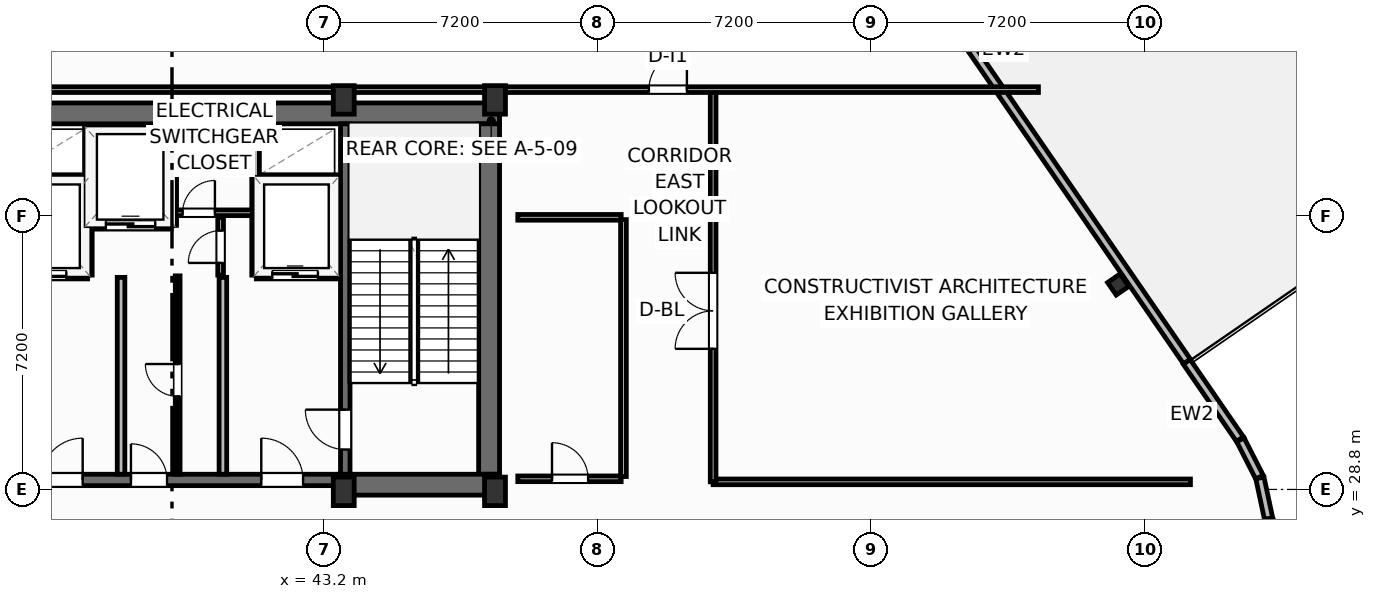
"""IFC4 building model, lengths in metres.
Left out: names, types, materials, properties, quantities, classifications, styles, units other than length and angle.
Written with IfcOpenShell. Run it as: python <this file> out.ifc"""

import sys

from ifc_helpers import new_model, si_unit, direction, frame, frame_2d, origin, origin_2d, place, context, subcontext, project, spatial, rectangle, i_section, extrude, element, fill, save


model = new_model("IFC4")
c1 = context("Model", 3, precision=1e-05, world=origin(), true_north=direction((0.0, 1.0)))
c2 = subcontext(c1, "Body", "Model", "MODEL_VIEW")
j1 = project(units=[si_unit("LENGTHUNIT", "METRE"), si_unit("PLANEANGLEUNIT", "RADIAN")], contexts=[c1])
p1 = place(None, origin())
s1 = spatial("IfcSite", under=j1, at=p1, CompositionType="ELEMENT")
p2 = place(p1, origin())
s2 = spatial("IfcBuilding", under=s1, at=p2, CompositionType="ELEMENT")
p3 = place(p2, frame((0.0, 0.0, 296.3)))
s3 = spatial("IfcBuildingStorey", under=s2, at=p3, CompositionType="ELEMENT", Elevation=296.3)
for number, where, z_axis, x_axis in (
    (1, (43.72, 28.75, 0.0), (0.0, 0.0, 1.0), (1.0, 0.0, 0.0)),
    (2, (47.7, 28.75, 0.0), (0.0, 0.0, 1.0), (1.0, 0.0, 0.0)),
    (3, (43.72, 39.05, 0.0), (0.0, 0.0, 1.0), (1.0, 0.0, 0.0)),
    (4, (47.7, 39.05, 0.0), (0.0, 0.0, 1.0), (1.0, 0.0, 0.0)),
):
    element("IfcColumn", number, at=place(p3, frame(where, z_axis=z_axis, x_axis=x_axis)), inside=s3, PredefinedType="COLUMN", context=c2, shape_type="SweptSolid", body=[
        extrude(rectangle(XDim=0.55, YDim=0.75, at=origin_2d()), origin(), (0.0, 0.0, 1.0), 4.8),
    ])
p4 = place(p3, frame((30.58, 38.695, 0.0), z_axis=(0.0, 0.0, 1.0), x_axis=(1.0, 0.0, 0.0)))
e5 = element("IfcWall", 5, at=p4, inside=s3, PredefinedType="SHEAR", context=c2, shape_type="SweptSolid", body=[
    extrude(rectangle(XDim=17.24, YDim=0.55, at=frame_2d((8.62, 0.0))), origin(), (0.0, 0.0, 1.0), 4.55),
])
p5 = place(p3, frame((47.545, 29.2, 0.0), z_axis=(0.0, 0.0, 1.0), x_axis=(0.0, 1.0, 0.0)))
e6 = element("IfcWall", 6, at=p5, inside=s3, PredefinedType="SHEAR", context=c2, shape_type="SweptSolid", body=[
    extrude(rectangle(XDim=9.22, YDim=0.55, at=frame_2d((4.61, 0.0))), origin(), (0.0, 0.0, 1.0), 4.55),
])
p6 = place(p3, frame((43.6, 28.925, 0.0), z_axis=(0.0, 0.0, 1.0), x_axis=(1.0, 0.0, 0.0)))
e7 = element("IfcWall", 7, at=p6, inside=s3, PredefinedType="SHEAR", context=c2, shape_type="SweptSolid", body=[
    extrude(rectangle(XDim=4.22, YDim=0.55, at=frame_2d((2.11, 0.0))), origin(), (0.0, 0.0, 1.0), 4.55),
])
p7 = place(p3, frame((34.8, 29.05, 0.0), z_axis=(0.0, 0.0, 1.0), x_axis=(1.0, 0.0, 0.0)))
e8 = element("IfcWall", 8, at=p7, inside=s3, PredefinedType="SHEAR", context=c2, shape_type="SweptSolid", body=[
    extrude(rectangle(XDim=8.8, YDim=0.3, at=frame_2d((4.4, 0.0))), origin(), (0.0, 0.0, 1.0), 4.55),
])
p8 = place(p7, frame((0.95, 0.0, 0.0)))
e9 = element("IfcOpeningElement", 9, at=p8, cuts=e8, PredefinedType="OPENING", context=c2, shape_type="SweptSolid", body=[
    extrude(rectangle(XDim=1.1, YDim=2.15, at=frame_2d((0.55, 1.075))), frame((0.0, 0.16, 0.0), z_axis=(0.0, -1.0, 0.0), x_axis=(1.0, 0.0, 0.0)), (0.0, 0.0, 1.0), 0.32),
])
p9 = place(p7, frame((6.75, 0.0, 0.0)))
e10 = element("IfcOpeningElement", 10, at=p9, cuts=e8, PredefinedType="OPENING", context=c2, shape_type="SweptSolid", body=[
    extrude(rectangle(XDim=1.1, YDim=2.15, at=frame_2d((0.55, 1.075))), frame((0.0, 0.16, 0.0), z_axis=(0.0, -1.0, 0.0), x_axis=(1.0, 0.0, 0.0)), (0.0, 0.0, 1.0), 0.32),
])
p10 = place(p7, frame((3.32, 0.0, 0.0)))
e11 = element("IfcOpeningElement", 11, at=p10, cuts=e8, PredefinedType="OPENING", context=c2, shape_type="SweptSolid", body=[
    extrude(rectangle(XDim=0.95, YDim=2.15, at=frame_2d((0.475, 1.075))), frame((0.0, 0.16, 0.0), z_axis=(0.0, -1.0, 0.0), x_axis=(1.0, 0.0, 0.0)), (0.0, 0.0, 1.0), 0.32),
])
p11 = place(p3, frame((43.76, 29.2, 0.0), z_axis=(0.0, 0.0, 1.0), x_axis=(0.0, 1.0, 0.0)))
e12 = element("IfcWall", 12, at=p11, inside=s3, PredefinedType="SHEAR", context=c2, shape_type="SweptSolid", body=[
    extrude(rectangle(XDim=9.22, YDim=0.25, at=frame_2d((4.61, 0.0))), origin(), (0.0, 0.0, 1.0), 4.55),
])
p12 = place(p11, frame((0.65, 0.0, 0.0)))
e13 = element("IfcOpeningElement", 13, at=p12, cuts=e12, PredefinedType="OPENING", context=c2, shape_type="SweptSolid", body=[
    extrude(rectangle(XDim=1.05, YDim=2.15, at=frame_2d((0.525, 1.075))), frame((0.0, 0.135, 0.0), z_axis=(0.0, -1.0, 0.0), x_axis=(1.0, 0.0, 0.0)), (0.0, 0.0, 1.0), 0.27),
])
p13 = place(p3, frame((64.099, 34.194, -0.32), z_axis=(0.0, 0.0, 1.0), x_axis=(0.823532597628, 0.567268949127, 0.0)))
e14 = element("IfcColumn", 14, at=p13, inside=s3, PredefinedType="COLUMN", context=c2, shape_type="SweptSolid", body=[
    extrude(i_section(OverallWidth=0.401, OverallDepth=0.399, WebThickness=0.025, FlangeThickness=0.04, FilletRadius=0.022, at=origin_2d()), origin(), (0.0, 0.0, 1.0), 5.12),
])
p14 = place(p3, frame((13.489, 27.37, 0.0), z_axis=(0.0, 0.0, 1.0), x_axis=(0.823532439547, 0.567269178622, 0.0)))
e15 = element("IfcWall", 15, at=p14, inside=s3, PredefinedType="SOLIDWALL", context=c2, shape_type="SweptSolid", body=[
    extrude(rectangle(XDim=40.0, YDim=0.22, at=frame_2d((20.0, 0.0))), origin(), (0.0, 0.0, 1.0), 3.83),
])
p15 = place(p14, frame((25.598, 0.0, 0.0)))
e16 = element("IfcOpeningElement", 16, at=p15, cuts=e15, PredefinedType="OPENING", context=c2, shape_type="SweptSolid", body=[
    extrude(rectangle(XDim=1.95, YDim=2.35, at=frame_2d((0.975, 1.175))), frame((0.0, 0.12, 0.0), z_axis=(0.0, -1.0, 0.0), x_axis=(1.0, 0.0, 0.0)), (0.0, 0.0, 1.0), 0.24),
])
p16 = place(p14, frame((0.55, 0.0, 0.75)))
e17 = element("IfcOpeningElement", 17, at=p16, cuts=e15, PredefinedType="OPENING", context=c2, shape_type="SweptSolid", body=[
    extrude(rectangle(XDim=2.6, YDim=2.0, at=frame_2d((1.3, 1.0))), frame((0.0, 0.12, 0.0), z_axis=(0.0, -1.0, 0.0), x_axis=(1.0, 0.0, 0.0)), (0.0, 0.0, 1.0), 0.24),
])
p17 = place(p14, frame((36.85, 0.0, 0.75)))
e18 = element("IfcOpeningElement", 18, at=p17, cuts=e15, PredefinedType="OPENING", context=c2, shape_type="SweptSolid", body=[
    extrude(rectangle(XDim=2.6, YDim=2.0, at=frame_2d((1.3, 1.0))), frame((0.0, 0.12, 0.0), z_axis=(0.0, -1.0, 0.0), x_axis=(1.0, 0.0, 0.0)), (0.0, 0.0, 1.0), 0.24),
])
p18 = place(p3, frame((55.132, 47.81, 0.0), z_axis=(0.0, 0.0, 1.0), x_axis=(0.567274059121, -0.823529077719, 0.0)))
e19 = element("IfcWall", 19, at=p18, inside=s3, PredefinedType="SOLIDWALL", context=c2, shape_type="SweptSolid", body=[
    extrude(rectangle(XDim=19.0, YDim=0.22, at=frame_2d((9.5, 0.0))), origin(), (0.0, 0.0, 1.0), 3.83),
])
p19 = place(p18, frame((4.562, 0.0, 0.0)))
e20 = element("IfcOpeningElement", 20, at=p19, cuts=e19, PredefinedType="OPENING", context=c2, shape_type="SweptSolid", body=[
    extrude(rectangle(XDim=1.95, YDim=2.35, at=frame_2d((0.975, 1.175))), frame((0.0, 0.12, 0.0), z_axis=(0.0, -1.0, 0.0), x_axis=(1.0, 0.0, 0.0)), (0.0, 0.0, 1.0), 0.24),
])
p20 = place(p3, frame((68.056, 28.035, 0.0), z_axis=(0.0, 0.0, 1.0), x_axis=(-0.208994780981, 0.977916755927, 0.0)))
e21 = element("IfcWall", 21, at=p20, inside=s3, PredefinedType="SOLIDWALL", context=c2, shape_type="SweptSolid", body=[
    extrude(rectangle(XDim=1.092, YDim=0.22, at=frame_2d((0.546, 0.0))), origin(), (0.0, 0.0, 1.0), 3.83),
])
p21 = place(p3, frame((67.816, 29.125, 0.0), z_axis=(0.0, 0.0, 1.0), x_axis=(-0.454833347613, 0.890576569363, 0.0)))
e22 = element("IfcWall", 22, at=p21, inside=s3, PredefinedType="SOLIDWALL", context=c2, shape_type="SweptSolid", body=[
    extrude(rectangle(XDim=1.1, YDim=0.22, at=frame_2d((0.55, 0.0))), origin(), (0.0, 0.0, 1.0), 3.83),
])
p22 = place(p3, frame((67.302, 30.125, 0.0), z_axis=(0.0, 0.0, 1.0), x_axis=(-0.567196370166, 0.823582587037, 0.0)))
e23 = element("IfcWall", 23, at=p22, inside=s3, PredefinedType="SOLIDWALL", context=c2, shape_type="SweptSolid", body=[
    extrude(rectangle(XDim=2.467, YDim=0.22, at=frame_2d((1.234, 0.0))), origin(), (0.0, 0.0, 1.0), 3.83),
])
p23 = place(p3, frame((53.44, 29.0, 0.0), z_axis=(0.0, 0.0, 1.0), x_axis=(1.0, 0.0, 0.0)))
e24 = element("IfcWall", 24, at=p23, inside=s3, PredefinedType="PARTITIONING", context=c2, shape_type="SweptSolid", body=[
    extrude(rectangle(XDim=12.56, YDim=0.15, at=frame_2d((6.28, 0.0))), origin(), (0.0, 0.0, 1.0), 4.55),
])
p24 = place(p3, frame((53.44, 29.0, 0.0), z_axis=(0.0, 0.0, 1.0), x_axis=(0.0, 1.0, 0.0)))
e25 = element("IfcWall", 25, at=p24, inside=s3, PredefinedType="PARTITIONING", context=c2, shape_type="SweptSolid", body=[
    extrude(rectangle(XDim=10.32, YDim=0.15, at=frame_2d((5.16, 0.0))), origin(), (0.0, 0.0, 1.0), 4.55),
])
p25 = place(p24, frame((3.5, 0.0, 0.0)))
e26 = element("IfcOpeningElement", 26, at=p25, cuts=e25, PredefinedType="OPENING", context=c2, shape_type="SweptSolid", body=[
    extrude(rectangle(XDim=2.0, YDim=2.05, at=frame_2d((1.0, 1.025))), frame((0.0, 0.085, 0.0), z_axis=(0.0, -1.0, 0.0), x_axis=(1.0, 0.0, 0.0)), (0.0, 0.0, 1.0), 0.17),
])
p26 = place(p3, frame((28.0, 39.32, 0.0), z_axis=(0.0, 0.0, 1.0), x_axis=(1.0, 0.0, 0.0)))
e27 = element("IfcWall", 27, at=p26, inside=s3, PredefinedType="PARTITIONING", context=c2, shape_type="SweptSolid", body=[
    extrude(rectangle(XDim=34.0, YDim=0.15, at=frame_2d((17.0, 0.0))), origin(), (0.0, 0.0, 1.0), 4.55),
])
p27 = place(p26, frame((23.75, 0.0, 0.0)))
e28 = element("IfcOpeningElement", 28, at=p27, cuts=e27, PredefinedType="OPENING", context=c2, shape_type="SweptSolid", body=[
    extrude(rectangle(XDim=1.0, YDim=2.05, at=frame_2d((0.5, 1.025))), frame((0.0, 0.085, 0.0), z_axis=(0.0, -1.0, 0.0), x_axis=(1.0, 0.0, 0.0)), (0.0, 0.0, 1.0), 0.17),
])
for number, where, z_axis, x_axis in (
    (29, (37.86, 29.2, 0.0), (0.0, 0.0, 1.0), (0.0, 1.0, 0.0)),
    (30, (40.54, 29.2, 0.0), (0.0, 0.0, 1.0), (0.0, 1.0, 0.0)),
):
    element("IfcWall", number, at=place(p3, frame(where, z_axis=z_axis, x_axis=x_axis)), inside=s3, PredefinedType="PARTITIONING", context=c2, shape_type="SweptSolid", body=[
        extrude(rectangle(XDim=5.18, YDim=0.2, at=frame_2d((2.59, 0.0))), origin(), (0.0, 0.0, 1.0), 4.55),
    ])
p28 = place(p3, frame((34.8, 34.44, 0.0), z_axis=(0.0, 0.0, 1.0), x_axis=(1.0, 0.0, 0.0)))
e31 = element("IfcWall", 31, at=p28, inside=s3, PredefinedType="PARTITIONING", context=c2, shape_type="SweptSolid", body=[
    extrude(rectangle(XDim=2.18, YDim=0.2, at=frame_2d((1.09, 0.0))), origin(), (0.0, 0.0, 1.0), 4.55),
])
p29 = place(p28, frame((0.42, 0.0, 0.0)))
e32 = element("IfcOpeningElement", 32, at=p29, cuts=e31, PredefinedType="OPENING", context=c2, shape_type="SweptSolid", body=[
    extrude(rectangle(XDim=1.2, YDim=2.2, at=frame_2d((0.6, 1.1))), frame((0.0, 0.11, 0.0), z_axis=(0.0, -1.0, 0.0), x_axis=(1.0, 0.0, 0.0)), (0.0, 0.0, 1.0), 0.22),
])
p30 = place(p3, frame((34.8, 36.98, 0.0), z_axis=(0.0, 0.0, 1.0), x_axis=(1.0, 0.0, 0.0)))
e33 = element("IfcWall", 33, at=p30, inside=s3, PredefinedType="PARTITIONING", context=c2, shape_type="SweptSolid", body=[
    extrude(rectangle(XDim=2.18, YDim=0.2, at=frame_2d((1.09, 0.0))), origin(), (0.0, 0.0, 1.0), 4.55),
])
p31 = place(p3, frame((37.0, 34.44, 0.0), z_axis=(0.0, 0.0, 1.0), x_axis=(0.0, 1.0, 0.0)))
e34 = element("IfcWall", 34, at=p31, inside=s3, PredefinedType="PARTITIONING", context=c2, shape_type="SweptSolid", body=[
    extrude(rectangle(XDim=3.9, YDim=0.2, at=frame_2d((1.95, 0.0))), origin(), (0.0, 0.0, 1.0), 4.55),
])
p32 = place(p3, frame((41.42, 34.44, 0.0), z_axis=(0.0, 0.0, 1.0), x_axis=(1.0, 0.0, 0.0)))
e35 = element("IfcWall", 35, at=p32, inside=s3, PredefinedType="PARTITIONING", context=c2, shape_type="SweptSolid", body=[
    extrude(rectangle(XDim=2.18, YDim=0.2, at=frame_2d((1.09, 0.0))), origin(), (0.0, 0.0, 1.0), 4.55),
])
p33 = place(p32, frame((0.42, 0.0, 0.0)))
e36 = element("IfcOpeningElement", 36, at=p33, cuts=e35, PredefinedType="OPENING", context=c2, shape_type="SweptSolid", body=[
    extrude(rectangle(XDim=1.2, YDim=2.2, at=frame_2d((0.6, 1.1))), frame((0.0, 0.11, 0.0), z_axis=(0.0, -1.0, 0.0), x_axis=(1.0, 0.0, 0.0)), (0.0, 0.0, 1.0), 0.22),
])
p34 = place(p3, frame((41.42, 36.98, 0.0), z_axis=(0.0, 0.0, 1.0), x_axis=(1.0, 0.0, 0.0)))
e37 = element("IfcWall", 37, at=p34, inside=s3, PredefinedType="PARTITIONING", context=c2, shape_type="SweptSolid", body=[
    extrude(rectangle(XDim=2.18, YDim=0.2, at=frame_2d((1.09, 0.0))), origin(), (0.0, 0.0, 1.0), 4.55),
])
p35 = place(p3, frame((41.4, 34.44, 0.0), z_axis=(0.0, 0.0, 1.0), x_axis=(0.0, 1.0, 0.0)))
e38 = element("IfcWall", 38, at=p35, inside=s3, PredefinedType="PARTITIONING", context=c2, shape_type="SweptSolid", body=[
    extrude(rectangle(XDim=3.9, YDim=0.2, at=frame_2d((1.95, 0.0))), origin(), (0.0, 0.0, 1.0), 4.55),
])
p36 = place(p3, frame((37.06, 35.75, 0.0), z_axis=(0.0, 0.0, 1.0), x_axis=(1.0, 0.0, 0.0)))
e39 = element("IfcWall", 39, at=p36, inside=s3, PredefinedType="PARTITIONING", context=c2, shape_type="SweptSolid", body=[
    extrude(rectangle(XDim=2.12, YDim=0.2, at=frame_2d((1.06, 0.0))), origin(), (0.0, 0.0, 1.0), 4.55),
])
p37 = place(p36, frame((0.4, 0.0, 0.0)))
e40 = element("IfcOpeningElement", 40, at=p37, cuts=e39, PredefinedType="OPENING", context=c2, shape_type="SweptSolid", body=[
    extrude(rectangle(XDim=1.3, YDim=2.2, at=frame_2d((0.65, 1.1))), frame((0.0, 0.11, 0.0), z_axis=(0.0, -1.0, 0.0), x_axis=(1.0, 0.0, 0.0)), (0.0, 0.0, 1.0), 0.22),
])
p38 = place(p3, frame((39.22, 35.75, 0.0), z_axis=(0.0, 0.0, 1.0), x_axis=(0.0, 1.0, 0.0)))
e41 = element("IfcWall", 41, at=p38, inside=s3, PredefinedType="PARTITIONING", context=c2, shape_type="SweptSolid", body=[
    extrude(rectangle(XDim=2.59, YDim=0.2, at=frame_2d((1.295, 0.0))), origin(), (0.0, 0.0, 1.0), 4.55),
])
p39 = place(p3, frame((39.3, 36.08, 0.0), z_axis=(0.0, 0.0, 1.0), x_axis=(1.0, 0.0, 0.0)))
e42 = element("IfcWall", 42, at=p39, inside=s3, PredefinedType="PARTITIONING", context=c2, shape_type="SweptSolid", body=[
    extrude(rectangle(XDim=2.02, YDim=0.15, at=frame_2d((1.01, 0.0))), origin(), (0.0, 0.0, 1.0), 4.55),
])
p40 = place(p39, frame((0.18, 0.0, 0.0)))
e43 = element("IfcOpeningElement", 43, at=p40, cuts=e42, PredefinedType="OPENING", context=c2, shape_type="SweptSolid", body=[
    extrude(rectangle(XDim=0.85, YDim=2.05, at=frame_2d((0.425, 1.025))), frame((0.0, 0.085, 0.0), z_axis=(0.0, -1.0, 0.0), x_axis=(1.0, 0.0, 0.0)), (0.0, 0.0, 1.0), 0.17),
])
p41 = place(p3, frame((40.48, 34.44, 0.0), z_axis=(0.0, 0.0, 1.0), x_axis=(0.0, 1.0, 0.0)))
e44 = element("IfcWall", 44, at=p41, inside=s3, PredefinedType="PARTITIONING", context=c2, shape_type="SweptSolid", body=[
    extrude(rectangle(XDim=1.52, YDim=0.15, at=frame_2d((0.76, 0.0))), origin(), (0.0, 0.0, 1.0), 4.55),
])
p42 = place(p41, frame((0.32, 0.0, 0.0)))
e45 = element("IfcOpeningElement", 45, at=p42, cuts=e44, PredefinedType="OPENING", context=c2, shape_type="SweptSolid", body=[
    extrude(rectangle(XDim=0.85, YDim=2.05, at=frame_2d((0.425, 1.025))), frame((0.0, 0.085, 0.0), z_axis=(0.0, -1.0, 0.0), x_axis=(1.0, 0.0, 0.0)), (0.0, 0.0, 1.0), 0.17),
])
p43 = place(p3, frame((39.35, 29.2, 0.0), z_axis=(0.0, 0.0, 1.0), x_axis=(0.0, 1.0, 0.0)))
e46 = element("IfcWall", 46, at=p43, inside=s3, PredefinedType="PARTITIONING", context=c2, shape_type="SweptSolid", body=[
    extrude(rectangle(XDim=5.22, YDim=0.125, at=frame_2d((2.61, 0.0))), origin(), (0.0, 0.0, 1.0), 4.55),
])
p44 = place(p43, frame((2.05, 0.0, 0.0)))
e47 = element("IfcOpeningElement", 47, at=p44, cuts=e46, PredefinedType="OPENING", context=c2, shape_type="SweptSolid", body=[
    extrude(rectangle(XDim=0.85, YDim=2.05, at=frame_2d((0.425, 1.025))), frame((0.0, 0.073, 0.0), z_axis=(0.0, -1.0, 0.0), x_axis=(1.0, 0.0, 0.0)), (0.0, 0.0, 1.0), 0.145),
])
p45 = place(p3, frame((48.3, 29.08, 0.0), z_axis=(0.0, 0.0, 1.0), x_axis=(1.0, 0.0, 0.0)))
e48 = element("IfcWall", 48, at=p45, inside=s3, PredefinedType="PARTITIONING", context=c2, shape_type="SweptSolid", body=[
    extrude(rectangle(XDim=2.72, YDim=0.15, at=frame_2d((1.36, 0.0))), origin(), (0.0, 0.0, 1.0), 4.55),
])
p46 = place(p45, frame((0.9, 0.0, 0.0)))
e49 = element("IfcOpeningElement", 49, at=p46, cuts=e48, PredefinedType="OPENING", context=c2, shape_type="SweptSolid", body=[
    extrude(rectangle(XDim=0.95, YDim=2.05, at=frame_2d((0.475, 1.025))), frame((0.0, 0.085, 0.0), z_axis=(0.0, -1.0, 0.0), x_axis=(1.0, 0.0, 0.0)), (0.0, 0.0, 1.0), 0.17),
])
p47 = place(p3, frame((48.3, 35.96, 0.0), z_axis=(0.0, 0.0, 1.0), x_axis=(1.0, 0.0, 0.0)))
e50 = element("IfcWall", 50, at=p47, inside=s3, PredefinedType="PARTITIONING", context=c2, shape_type="SweptSolid", body=[
    extrude(rectangle(XDim=2.72, YDim=0.15, at=frame_2d((1.36, 0.0))), origin(), (0.0, 0.0, 1.0), 4.55),
])
p48 = place(p3, frame((51.08, 29.14, 0.0), z_axis=(0.0, 0.0, 1.0), x_axis=(0.0, 1.0, 0.0)))
e51 = element("IfcWall", 51, at=p48, inside=s3, PredefinedType="PARTITIONING", context=c2, shape_type="SweptSolid", body=[
    extrude(rectangle(XDim=6.76, YDim=0.15, at=frame_2d((3.38, 0.0))), origin(), (0.0, 0.0, 1.0), 4.55),
])
p49 = place(p25, origin())
e52 = element("IfcDoor", 52, at=p49, inside=s3, OperationType="DOUBLE_DOOR_SINGLE_SWING", PredefinedType="DOOR", context=c2, shape_type="SweptSolid", body=[
    extrude(rectangle(XDim=2.0, YDim=2.05, at=frame_2d((1.0, 1.025))), frame((0.0, 0.025, 0.0), z_axis=(0.0, -1.0, 0.0), x_axis=(1.0, 0.0, 0.0)), (0.0, 0.0, 1.0), 0.05),
])
fill(e26, e52)
p50 = place(p27, origin())
e53 = element("IfcDoor", 53, at=p50, inside=s3, OperationType="SINGLE_SWING_RIGHT", PredefinedType="DOOR", context=c2, shape_type="SweptSolid", body=[
    extrude(rectangle(XDim=1.0, YDim=2.05, at=frame_2d((0.5, 1.025))), frame((0.0, 0.025, 0.0), z_axis=(0.0, -1.0, 0.0), x_axis=(1.0, 0.0, 0.0)), (0.0, 0.0, 1.0), 0.05),
])
fill(e28, e53)
p51 = place(p12, origin())
e54 = element("IfcDoor", 54, at=p51, inside=s3, OperationType="SINGLE_SWING_RIGHT", PredefinedType="DOOR", context=c2, shape_type="SweptSolid", body=[
    extrude(rectangle(XDim=1.05, YDim=2.15, at=frame_2d((0.525, 1.075))), frame((0.0, 0.025, 0.0), z_axis=(0.0, -1.0, 0.0), x_axis=(1.0, 0.0, 0.0)), (0.0, 0.0, 1.0), 0.05),
])
fill(e13, e54)
p52 = place(p8, origin())
e55 = element("IfcDoor", 55, at=p52, inside=s3, OperationType="SINGLE_SWING_RIGHT", PredefinedType="DOOR", context=c2, shape_type="SweptSolid", body=[
    extrude(rectangle(XDim=1.1, YDim=2.15, at=frame_2d((0.55, 1.075))), frame((0.0, 0.025, 0.0), z_axis=(0.0, -1.0, 0.0), x_axis=(1.0, 0.0, 0.0)), (0.0, 0.0, 1.0), 0.05),
])
fill(e9, e55)
p53 = place(p9, origin())
e56 = element("IfcDoor", 56, at=p53, inside=s3, OperationType="SINGLE_SWING_LEFT", PredefinedType="DOOR", context=c2, shape_type="SweptSolid", body=[
    extrude(rectangle(XDim=1.1, YDim=2.15, at=frame_2d((0.55, 1.075))), frame((0.0, 0.025, 0.0), z_axis=(0.0, -1.0, 0.0), x_axis=(1.0, 0.0, 0.0)), (0.0, 0.0, 1.0), 0.05),
])
fill(e10, e56)
p54 = place(p29, origin())
e57 = element("IfcDoor", 57, at=p54, inside=s3, OperationType="SLIDING_TO_LEFT", PredefinedType="DOOR", context=c2, shape_type="SweptSolid", body=[
    extrude(rectangle(XDim=1.2, YDim=2.2, at=frame_2d((0.6, 1.1))), frame((0.0, 0.025, 0.0), z_axis=(0.0, -1.0, 0.0), x_axis=(1.0, 0.0, 0.0)), (0.0, 0.0, 1.0), 0.05),
])
fill(e32, e57)
p55 = place(p33, origin())
e58 = element("IfcDoor", 58, at=p55, inside=s3, OperationType="SLIDING_TO_LEFT", PredefinedType="DOOR", context=c2, shape_type="SweptSolid", body=[
    extrude(rectangle(XDim=1.2, YDim=2.2, at=frame_2d((0.6, 1.1))), frame((0.0, 0.025, 0.0), z_axis=(0.0, -1.0, 0.0), x_axis=(1.0, 0.0, 0.0)), (0.0, 0.0, 1.0), 0.05),
])
fill(e36, e58)
p56 = place(p37, origin())
e59 = element("IfcDoor", 59, at=p56, inside=s3, OperationType="SLIDING_TO_LEFT", PredefinedType="DOOR", context=c2, shape_type="SweptSolid", body=[
    extrude(rectangle(XDim=1.3, YDim=2.2, at=frame_2d((0.65, 1.1))), frame((0.0, 0.025, 0.0), z_axis=(0.0, -1.0, 0.0), x_axis=(1.0, 0.0, 0.0)), (0.0, 0.0, 1.0), 0.05),
])
fill(e40, e59)
p57 = place(p40, origin())
e60 = element("IfcDoor", 60, at=p57, inside=s3, OperationType="SINGLE_SWING_RIGHT", PredefinedType="DOOR", context=c2, shape_type="SweptSolid", body=[
    extrude(rectangle(XDim=0.85, YDim=2.05, at=frame_2d((0.425, 1.025))), frame((0.0, 0.025, 0.0), z_axis=(0.0, -1.0, 0.0), x_axis=(1.0, 0.0, 0.0)), (0.0, 0.0, 1.0), 0.05),
])
fill(e43, e60)
p58 = place(p42, origin())
e61 = element("IfcDoor", 61, at=p58, inside=s3, OperationType="SINGLE_SWING_LEFT", PredefinedType="DOOR", context=c2, shape_type="SweptSolid", body=[
    extrude(rectangle(XDim=0.85, YDim=2.05, at=frame_2d((0.425, 1.025))), frame((0.0, 0.025, 0.0), z_axis=(0.0, -1.0, 0.0), x_axis=(1.0, 0.0, 0.0)), (0.0, 0.0, 1.0), 0.05),
])
fill(e45, e61)
p59 = place(p44, origin())
e62 = element("IfcDoor", 62, at=p59, inside=s3, OperationType="SINGLE_SWING_RIGHT", PredefinedType="DOOR", context=c2, shape_type="SweptSolid", body=[
    extrude(rectangle(XDim=0.85, YDim=2.05, at=frame_2d((0.425, 1.025))), frame((0.0, 0.025, 0.0), z_axis=(0.0, -1.0, 0.0), x_axis=(1.0, 0.0, 0.0)), (0.0, 0.0, 1.0), 0.05),
])
fill(e47, e62)
p60 = place(p10, origin())
e63 = element("IfcDoor", 63, at=p60, inside=s3, OperationType="SINGLE_SWING_LEFT", PredefinedType="DOOR", context=c2, shape_type="SweptSolid", body=[
    extrude(rectangle(XDim=0.95, YDim=2.15, at=frame_2d((0.475, 1.075))), frame((0.0, 0.025, 0.0), z_axis=(0.0, -1.0, 0.0), x_axis=(1.0, 0.0, 0.0)), (0.0, 0.0, 1.0), 0.05),
])
fill(e11, e63)
p61 = place(p46, origin())
e64 = element("IfcDoor", 64, at=p61, inside=s3, OperationType="SINGLE_SWING_LEFT", PredefinedType="DOOR", context=c2, shape_type="SweptSolid", body=[
    extrude(rectangle(XDim=0.95, YDim=2.05, at=frame_2d((0.475, 1.025))), frame((0.0, 0.025, 0.0), z_axis=(0.0, -1.0, 0.0), x_axis=(1.0, 0.0, 0.0)), (0.0, 0.0, 1.0), 0.05),
])
fill(e49, e64)
save(model, sys.argv[1])
